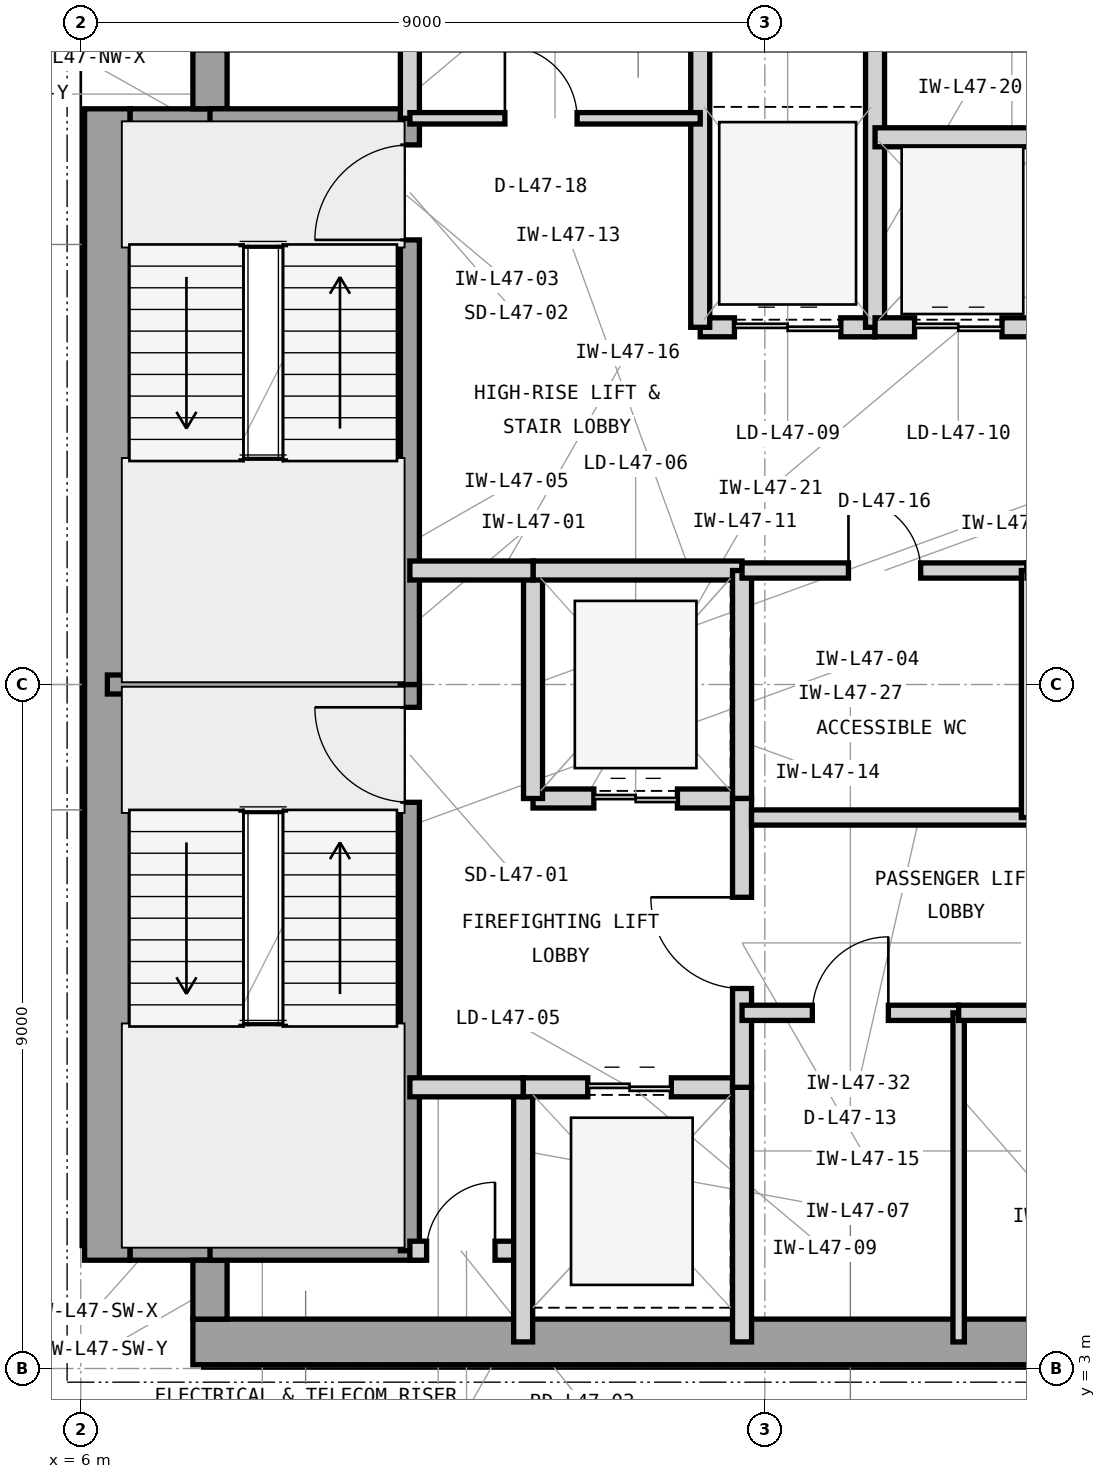
"""IFC4 building model, lengths in metres.
Left out: names, types, materials, properties, quantities, classifications, styles, units other than length and angle.
Written with IfcOpenShell. Run it as: python <this file> out.ifc"""

import sys

from ifc_helpers import new_model, si_unit, direction, frame, frame_2d, origin, place, context, subcontext, project, spatial, rectangle, extrude, element, fill, save


model = new_model("IFC4")
c1 = context("Model", 3, precision=1e-05, world=origin(), true_north=direction((0.0, 1.0)))
c2 = subcontext(c1, "Body", "Model", "MODEL_VIEW")
j1 = project(units=[si_unit("LENGTHUNIT", "METRE"), si_unit("PLANEANGLEUNIT", "RADIAN")], contexts=[c1])
p1 = place(None, origin())
s1 = spatial("IfcSite", under=j1, at=p1, CompositionType="ELEMENT")
p2 = place(p1, origin())
s2 = spatial("IfcBuilding", under=s1, at=p2, CompositionType="ELEMENT")
p3 = place(p2, frame((0.0, 0.0, 195.6)))
s3 = spatial("IfcBuildingStorey", under=s2, at=p3, CompositionType="ELEMENT", Elevation=195.6)
p4 = place(p3, frame((7.475, 3.35, 0.0), z_axis=(0.0, 0.0, 1.0), x_axis=(1.0, 0.0, 0.0)))
e1 = element("IfcWall", 1, at=p4, inside=s3, PredefinedType="SHEAR", context=c2, shape_type="SweptSolid", body=[
    extrude(rectangle(XDim=16.475, YDim=0.6, at=frame_2d((8.237, 0.0))), origin(), (0.0, 0.0, 1.0), 3.9),
])
p5 = place(p3, frame((6.35, 4.425, 0.0), z_axis=(0.0, 0.0, 1.0), x_axis=(0.0, 1.0, 0.0)))
e2 = element("IfcWall", 2, at=p5, inside=s3, PredefinedType="SHEAR", context=c2, shape_type="SweptSolid", body=[
    extrude(rectangle(XDim=15.15, YDim=0.6, at=frame_2d((7.575, 0.0))), origin(), (0.0, 0.0, 1.0), 3.9),
])
p6 = place(p3, frame((6.65, 4.65, 0.0), z_axis=(0.0, 0.0, 1.0), x_axis=(1.0, 0.0, 0.0)))
e3 = element("IfcWall", 3, at=p6, inside=s3, PredefinedType="SHEAR", context=c2, shape_type="SweptSolid", body=[
    extrude(rectangle(XDim=1.275, YDim=0.45, at=frame_2d((0.638, 0.0))), origin(), (0.0, 0.0, 1.0), 3.9),
])
p7 = place(p3, frame((7.7, 3.65, 0.0), z_axis=(0.0, 0.0, 1.0), x_axis=(0.0, 1.0, 0.0)))
e4 = element("IfcWall", 4, at=p7, inside=s3, PredefinedType="SHEAR", context=c2, shape_type="SweptSolid", body=[
    extrude(rectangle(XDim=0.775, YDim=0.45, at=frame_2d((0.388, 0.0))), origin(), (0.0, 0.0, 1.0), 3.9),
])
p8 = place(p3, frame((6.65, 19.35, 0.0), z_axis=(0.0, 0.0, 1.0), x_axis=(1.0, 0.0, 0.0)))
e5 = element("IfcWall", 5, at=p8, inside=s3, PredefinedType="SHEAR", context=c2, shape_type="SweptSolid", body=[
    extrude(rectangle(XDim=1.275, YDim=0.45, at=frame_2d((0.638, 0.0))), origin(), (0.0, 0.0, 1.0), 3.9),
])
p9 = place(p3, frame((7.7, 19.575, 0.0), z_axis=(0.0, 0.0, 1.0), x_axis=(0.0, 1.0, 0.0)))
e6 = element("IfcWall", 6, at=p9, inside=s3, PredefinedType="SHEAR", context=c2, shape_type="SweptSolid", body=[
    extrude(rectangle(XDim=0.775, YDim=0.45, at=frame_2d((0.388, 0.0))), origin(), (0.0, 0.0, 1.0), 3.9),
])
p10 = place(p3, frame((6.35, 12.0, 0.0), z_axis=(0.0, 0.0, 1.0), x_axis=(1.0, 0.0, 0.0)))
e7 = element("IfcWall", 7, at=p10, inside=s3, PredefinedType="SHEAR", context=c2, shape_type="SweptSolid", body=[
    extrude(rectangle(XDim=4.105, YDim=0.25, at=frame_2d((2.052, 0.0))), origin(), (0.0, 0.0, 1.0), 3.9),
])
for number, where, z_axis, x_axis in (
    (8, (7.7, 4.55, 0.0), (0.0, 0.0, 1.0), (1.0, 0.0, 0.0)),
    (9, (7.7, 19.45, 0.0), (0.0, 0.0, 1.0), (1.0, 0.0, 0.0)),
):
    element("IfcWall", number, at=place(p3, frame(where, z_axis=z_axis, x_axis=x_axis)), inside=s3, PredefinedType="SHEAR", context=c2, shape_type="SweptSolid", body=[
        extrude(rectangle(XDim=2.755, YDim=0.25, at=frame_2d((1.377, 0.0))), origin(), (0.0, 0.0, 1.0), 3.9),
    ])
p11 = place(p3, frame((10.33, 4.55, 0.0), z_axis=(0.0, 0.0, 1.0), x_axis=(0.0, 1.0, 0.0)))
e10 = element("IfcWall", 10, at=p11, inside=s3, PredefinedType="SHEAR", context=c2, shape_type="SweptSolid", body=[
    extrude(rectangle(XDim=7.45, YDim=0.25, at=frame_2d((3.725, 0.0))), origin(), (0.0, 0.0, 1.0), 3.9),
])
p12 = place(p11, frame((5.9, 0.0, 0.0)))
e11 = element("IfcOpeningElement", 11, at=p12, cuts=e10, PredefinedType="OPENING", context=c2, shape_type="SweptSolid", body=[
    extrude(rectangle(XDim=1.25, YDim=2.2, at=frame_2d((0.625, 1.1))), frame((0.0, 0.135, 0.0), z_axis=(0.0, -1.0, 0.0), x_axis=(1.0, 0.0, 0.0)), (0.0, 0.0, 1.0), 0.27),
])
p13 = place(p3, frame((10.33, 12.0, 0.0), z_axis=(0.0, 0.0, 1.0), x_axis=(0.0, 1.0, 0.0)))
e12 = element("IfcWall", 12, at=p13, inside=s3, PredefinedType="SHEAR", context=c2, shape_type="SweptSolid", body=[
    extrude(rectangle(XDim=7.45, YDim=0.25, at=frame_2d((3.725, 0.0))), origin(), (0.0, 0.0, 1.0), 3.9),
])
p14 = place(p13, frame((5.85, 0.0, 0.0)))
e13 = element("IfcOpeningElement", 13, at=p14, cuts=e12, PredefinedType="OPENING", context=c2, shape_type="SweptSolid", body=[
    extrude(rectangle(XDim=1.25, YDim=2.2, at=frame_2d((0.625, 1.1))), frame((0.0, 0.135, 0.0), z_axis=(0.0, -1.0, 0.0), x_axis=(1.0, 0.0, 0.0)), (0.0, 0.0, 1.0), 0.27),
])
p15 = place(p3, frame((10.33, 4.55, 0.0), z_axis=(0.0, 0.0, 1.0), x_axis=(1.0, 0.0, 0.0)))
e14 = element("IfcWall", 14, at=p15, inside=s3, PredefinedType="PARTITIONING", context=c2, shape_type="SweptSolid", body=[
    extrude(rectangle(XDim=1.49, YDim=0.25, at=frame_2d((0.745, 0.0))), origin(), (0.0, 0.0, 1.0), 3.69),
])
p16 = place(p15, frame((0.22, 0.0, 0.0)))
e15 = element("IfcOpeningElement", 15, at=p16, cuts=e14, PredefinedType="OPENING", context=c2, shape_type="SweptSolid", body=[
    extrude(rectangle(XDim=0.9, YDim=2.1, at=frame_2d((0.45, 1.05))), frame((0.0, 0.135, 0.0), z_axis=(0.0, -1.0, 0.0), x_axis=(1.0, 0.0, 0.0)), (0.0, 0.0, 1.0), 0.27),
])
p17 = place(p3, frame((11.82, 3.35, 0.0), z_axis=(0.0, 0.0, 1.0), x_axis=(0.0, 1.0, 0.0)))
e16 = element("IfcWall", 16, at=p17, inside=s3, PredefinedType="PARTITIONING", context=c2, shape_type="SweptSolid", body=[
    extrude(rectangle(XDim=3.35, YDim=0.25, at=frame_2d((1.675, 0.0))), origin(), (0.0, 0.0, 1.0), 3.69),
])
p18 = place(p3, frame((10.33, 19.45, 0.0), z_axis=(0.0, 0.0, 1.0), x_axis=(0.0, 1.0, 0.0)))
e17 = element("IfcWall", 17, at=p18, inside=s3, PredefinedType="PARTITIONING", context=c2, shape_type="SweptSolid", body=[
    extrude(rectangle(XDim=1.2, YDim=0.25, at=frame_2d((0.6, 0.0))), origin(), (0.0, 0.0, 1.0), 3.69),
])
p19 = place(p3, frame((11.82, 6.7, 0.0), z_axis=(0.0, 0.0, 1.0), x_axis=(1.0, 0.0, 0.0)))
e18 = element("IfcWall", 18, at=p19, inside=s3, PredefinedType="PARTITIONING", context=c2, shape_type="SweptSolid", body=[
    extrude(rectangle(XDim=2.88, YDim=0.25, at=frame_2d((1.44, 0.0))), origin(), (0.0, 0.0, 1.0), 3.283),
])
p20 = place(p19, frame((0.85, 0.0, 0.0)))
e19 = element("IfcOpeningElement", 19, at=p20, cuts=e18, PredefinedType="OPENING", context=c2, shape_type="SweptSolid", body=[
    extrude(rectangle(XDim=1.1, YDim=2.25, at=frame_2d((0.55, 1.125))), frame((0.0, 0.135, 0.0), z_axis=(0.0, -1.0, 0.0), x_axis=(1.0, 0.0, 0.0)), (0.0, 0.0, 1.0), 0.27),
])
p21 = place(p3, frame((14.7, 3.35, 0.0), z_axis=(0.0, 0.0, 1.0), x_axis=(0.0, 1.0, 0.0)))
e20 = element("IfcWall", 20, at=p21, inside=s3, PredefinedType="PARTITIONING", context=c2, shape_type="SweptSolid", body=[
    extrude(rectangle(XDim=3.35, YDim=0.25, at=frame_2d((1.675, 0.0))), origin(), (0.0, 0.0, 1.0), 3.69),
])
p22 = place(p3, frame((11.95, 10.5, 0.0), z_axis=(0.0, 0.0, 1.0), x_axis=(1.0, 0.0, 0.0)))
e21 = element("IfcWall", 21, at=p22, inside=s3, PredefinedType="PARTITIONING", context=c2, shape_type="SweptSolid", body=[
    extrude(rectangle(XDim=2.75, YDim=0.25, at=frame_2d((1.375, 0.0))), origin(), (0.0, 0.0, 1.0), 3.283),
])
p23 = place(p22, frame((0.8, 0.0, 0.0)))
e22 = element("IfcOpeningElement", 22, at=p23, cuts=e21, PredefinedType="OPENING", context=c2, shape_type="SweptSolid", body=[
    extrude(rectangle(XDim=1.1, YDim=2.25, at=frame_2d((0.55, 1.125))), frame((0.0, 0.135, 0.0), z_axis=(0.0, -1.0, 0.0), x_axis=(1.0, 0.0, 0.0)), (0.0, 0.0, 1.0), 0.27),
])
p24 = place(p3, frame((11.95, 10.5, 0.0), z_axis=(0.0, 0.0, 1.0), x_axis=(0.0, 1.0, 0.0)))
e23 = element("IfcWall", 23, at=p24, inside=s3, PredefinedType="PARTITIONING", context=c2, shape_type="SweptSolid", body=[
    extrude(rectangle(XDim=3.0, YDim=0.25, at=frame_2d((1.5, 0.0))), origin(), (0.0, 0.0, 1.0), 3.69),
])
p25 = place(p3, frame((11.95, 13.5, 0.0), z_axis=(0.0, 0.0, 1.0), x_axis=(1.0, 0.0, 0.0)))
e24 = element("IfcWall", 24, at=p25, inside=s3, PredefinedType="PARTITIONING", context=c2, shape_type="SweptSolid", body=[
    extrude(rectangle(XDim=2.75, YDim=0.25, at=frame_2d((1.375, 0.0))), origin(), (0.0, 0.0, 1.0), 3.283),
])
p26 = place(p3, frame((14.7, 10.5, 0.0), z_axis=(0.0, 0.0, 1.0), x_axis=(0.0, 1.0, 0.0)))
e25 = element("IfcWall", 25, at=p26, inside=s3, PredefinedType="PARTITIONING", context=c2, shape_type="SweptSolid", body=[
    extrude(rectangle(XDim=3.0, YDim=0.25, at=frame_2d((1.5, 0.0))), origin(), (0.0, 0.0, 1.0), 3.69),
])
p27 = place(p3, frame((14.7, 6.7, 0.0), z_axis=(0.0, 0.0, 1.0), x_axis=(0.0, 1.0, 0.0)))
e26 = element("IfcWall", 26, at=p27, inside=s3, PredefinedType="PARTITIONING", context=c2, shape_type="SweptSolid", body=[
    extrude(rectangle(XDim=3.8, YDim=0.25, at=frame_2d((1.9, 0.0))), origin(), (0.0, 0.0, 1.0), 3.69),
])
p28 = place(p27, frame((1.3, 0.0, 0.0)))
e27 = element("IfcOpeningElement", 27, at=p28, cuts=e26, PredefinedType="OPENING", context=c2, shape_type="SweptSolid", body=[
    extrude(rectangle(XDim=1.2, YDim=2.2, at=frame_2d((0.6, 1.1))), frame((0.0, 0.135, 0.0), z_axis=(0.0, -1.0, 0.0), x_axis=(1.0, 0.0, 0.0)), (0.0, 0.0, 1.0), 0.27),
])
p29 = place(p3, frame((10.33, 13.5, 0.0), z_axis=(0.0, 0.0, 1.0), x_axis=(1.0, 0.0, 0.0)))
e28 = element("IfcWall", 28, at=p29, inside=s3, PredefinedType="PARTITIONING", context=c2, shape_type="SweptSolid", body=[
    extrude(rectangle(XDim=1.62, YDim=0.25, at=frame_2d((0.81, 0.0))), origin(), (0.0, 0.0, 1.0), 3.283),
])
p30 = place(p3, frame((10.33, 6.7, 0.0), z_axis=(0.0, 0.0, 1.0), x_axis=(1.0, 0.0, 0.0)))
e29 = element("IfcWall", 29, at=p30, inside=s3, PredefinedType="PARTITIONING", context=c2, shape_type="SweptSolid", body=[
    extrude(rectangle(XDim=1.49, YDim=0.25, at=frame_2d((0.745, 0.0))), origin(), (0.0, 0.0, 1.0), 3.283),
])
p31 = place(p3, frame((14.15, 16.7, 0.0), z_axis=(0.0, 0.0, 1.0), x_axis=(1.0, 0.0, 0.0)))
e30 = element("IfcWall", 30, at=p31, inside=s3, PredefinedType="PARTITIONING", context=c2, shape_type="SweptSolid", body=[
    extrude(rectangle(XDim=2.3, YDim=0.25, at=frame_2d((1.15, 0.0))), origin(), (0.0, 0.0, 1.0), 3.283),
])
p32 = place(p31, frame((0.45, 0.0, 0.0)))
e31 = element("IfcOpeningElement", 31, at=p32, cuts=e30, PredefinedType="OPENING", context=c2, shape_type="SweptSolid", body=[
    extrude(rectangle(XDim=1.4, YDim=2.35, at=frame_2d((0.7, 1.175))), frame((0.0, 0.135, 0.0), z_axis=(0.0, -1.0, 0.0), x_axis=(1.0, 0.0, 0.0)), (0.0, 0.0, 1.0), 0.27),
])
for number, where, z_axis, x_axis in (
    (32, (14.15, 16.7, 0.0), (0.0, 0.0, 1.0), (0.0, 1.0, 0.0)),
    (33, (16.45, 16.7, 0.0), (0.0, 0.0, 1.0), (0.0, 1.0, 0.0)),
):
    element("IfcWall", number, at=place(p3, frame(where, z_axis=z_axis, x_axis=x_axis)), inside=s3, PredefinedType="PARTITIONING", context=c2, shape_type="SweptSolid", body=[
        extrude(rectangle(XDim=3.95, YDim=0.25, at=frame_2d((1.975, 0.0))), origin(), (0.0, 0.0, 1.0), 3.69),
    ])
p33 = place(p3, frame((16.45, 16.7, 0.0), z_axis=(0.0, 0.0, 1.0), x_axis=(1.0, 0.0, 0.0)))
e34 = element("IfcWall", 34, at=p33, inside=s3, PredefinedType="PARTITIONING", context=c2, shape_type="SweptSolid", body=[
    extrude(rectangle(XDim=2.3, YDim=0.25, at=frame_2d((1.15, 0.0))), origin(), (0.0, 0.0, 1.0), 3.283),
])
p34 = place(p33, frame((0.52, 0.0, 0.0)))
e35 = element("IfcOpeningElement", 35, at=p34, cuts=e34, PredefinedType="OPENING", context=c2, shape_type="SweptSolid", body=[
    extrude(rectangle(XDim=1.15, YDim=2.25, at=frame_2d((0.575, 1.125))), frame((0.0, 0.135, 0.0), z_axis=(0.0, -1.0, 0.0), x_axis=(1.0, 0.0, 0.0)), (0.0, 0.0, 1.0), 0.27),
])
p35 = place(p3, frame((16.45, 19.2, 0.0), z_axis=(0.0, 0.0, 1.0), x_axis=(1.0, 0.0, 0.0)))
e36 = element("IfcWall", 36, at=p35, inside=s3, PredefinedType="PARTITIONING", context=c2, shape_type="SweptSolid", body=[
    extrude(rectangle(XDim=7.2, YDim=0.25, at=frame_2d((3.6, 0.0))), origin(), (0.0, 0.0, 1.0), 3.69),
])
p36 = place(p3, frame((14.7, 7.68, 0.0), z_axis=(0.0, 0.0, 1.0), x_axis=(1.0, 0.0, 0.0)))
e37 = element("IfcWall", 37, at=p36, inside=s3, PredefinedType="PARTITIONING", context=c2, shape_type="SweptSolid", body=[
    extrude(rectangle(XDim=2.85, YDim=0.2, at=frame_2d((1.425, 0.0))), origin(), (0.0, 0.0, 1.0), 3.69),
])
p37 = place(p36, frame((0.925, 0.0, 0.0)))
e38 = element("IfcOpeningElement", 38, at=p37, cuts=e37, PredefinedType="OPENING", context=c2, shape_type="SweptSolid", body=[
    extrude(rectangle(XDim=1.0, YDim=2.15, at=frame_2d((0.5, 1.075))), frame((0.0, 0.11, 0.0), z_axis=(0.0, -1.0, 0.0), x_axis=(1.0, 0.0, 0.0)), (0.0, 0.0, 1.0), 0.22),
])
p38 = place(p3, frame((17.55, 3.35, 0.0), z_axis=(0.0, 0.0, 1.0), x_axis=(0.0, 1.0, 0.0)))
e39 = element("IfcWall", 39, at=p38, inside=s3, PredefinedType="PARTITIONING", context=c2, shape_type="SweptSolid", body=[
    extrude(rectangle(XDim=4.33, YDim=0.15, at=frame_2d((2.165, 0.0))), origin(), (0.0, 0.0, 1.0), 3.69),
])
p39 = place(p3, frame((17.55, 7.68, 0.0), z_axis=(0.0, 0.0, 1.0), x_axis=(1.0, 0.0, 0.0)))
e40 = element("IfcWall", 40, at=p39, inside=s3, PredefinedType="PARTITIONING", context=c2, shape_type="SweptSolid", body=[
    extrude(rectangle(XDim=3.0, YDim=0.2, at=frame_2d((1.5, 0.0))), origin(), (0.0, 0.0, 1.0), 3.69),
])
p40 = place(p39, frame((1.05, 0.0, 0.0)))
e41 = element("IfcOpeningElement", 41, at=p40, cuts=e40, PredefinedType="OPENING", context=c2, shape_type="SweptSolid", body=[
    extrude(rectangle(XDim=0.9, YDim=2.1, at=frame_2d((0.45, 1.05))), frame((0.0, 0.11, 0.0), z_axis=(0.0, -1.0, 0.0), x_axis=(1.0, 0.0, 0.0)), (0.0, 0.0, 1.0), 0.22),
])
p41 = place(p3, frame((14.825, 10.25, 0.0), z_axis=(0.0, 0.0, 1.0), x_axis=(1.0, 0.0, 0.0)))
e42 = element("IfcWall", 42, at=p41, inside=s3, PredefinedType="PARTITIONING", context=c2, shape_type="SweptSolid", body=[
    extrude(rectangle(XDim=8.825, YDim=0.2, at=frame_2d((4.413, 0.0))), origin(), (0.0, 0.0, 1.0), 3.69),
])
p42 = place(p3, frame((14.7, 13.5, 0.0), z_axis=(0.0, 0.0, 1.0), x_axis=(1.0, 0.0, 0.0)))
e43 = element("IfcWall", 43, at=p42, inside=s3, PredefinedType="PARTITIONING", context=c2, shape_type="SweptSolid", body=[
    extrude(rectangle(XDim=3.75, YDim=0.2, at=frame_2d((1.875, 0.0))), origin(), (0.0, 0.0, 1.0), 3.283),
])
p43 = place(p42, frame((1.4, 0.0, 0.0)))
e44 = element("IfcOpeningElement", 44, at=p43, cuts=e43, PredefinedType="OPENING", context=c2, shape_type="SweptSolid", body=[
    extrude(rectangle(XDim=0.95, YDim=2.1, at=frame_2d((0.475, 1.05))), frame((0.0, 0.11, 0.0), z_axis=(0.0, -1.0, 0.0), x_axis=(1.0, 0.0, 0.0)), (0.0, 0.0, 1.0), 0.22),
])
p44 = place(p3, frame((18.45, 10.25, 0.0), z_axis=(0.0, 0.0, 1.0), x_axis=(0.0, 1.0, 0.0)))
e45 = element("IfcWall", 45, at=p44, inside=s3, PredefinedType="PARTITIONING", context=c2, shape_type="SweptSolid", body=[
    extrude(rectangle(XDim=3.25, YDim=0.15, at=frame_2d((1.625, 0.0))), origin(), (0.0, 0.0, 1.0), 3.69),
])
p45 = place(p3, frame((10.33, 19.45, 0.0), z_axis=(0.0, 0.0, 1.0), x_axis=(1.0, 0.0, 0.0)))
e46 = element("IfcWall", 46, at=p45, inside=s3, PredefinedType="PARTITIONING", context=c2, shape_type="SweptSolid", body=[
    extrude(rectangle(XDim=3.82, YDim=0.15, at=frame_2d((1.91, 0.0))), origin(), (0.0, 0.0, 1.0), 3.69),
])
p46 = place(p45, frame((1.25, 0.0, 0.0)))
e47 = element("IfcOpeningElement", 47, at=p46, cuts=e46, PredefinedType="OPENING", context=c2, shape_type="SweptSolid", body=[
    extrude(rectangle(XDim=0.95, YDim=2.1, at=frame_2d((0.475, 1.05))), frame((0.0, 0.085, 0.0), z_axis=(0.0, -1.0, 0.0), x_axis=(1.0, 0.0, 0.0)), (0.0, 0.0, 1.0), 0.17),
])
p47 = place(p12, origin())
e48 = element("IfcDoor", 48, at=p47, inside=s3, OperationType="SINGLE_SWING_RIGHT", PredefinedType="DOOR", context=c2, shape_type="SweptSolid", body=[
    extrude(rectangle(XDim=1.25, YDim=2.2, at=frame_2d((0.625, 1.1))), frame((0.0, 0.025, 0.0), z_axis=(0.0, -1.0, 0.0), x_axis=(1.0, 0.0, 0.0)), (0.0, 0.0, 1.0), 0.05),
])
fill(e11, e48)
p48 = place(p14, origin())
e49 = element("IfcDoor", 49, at=p48, inside=s3, OperationType="SINGLE_SWING_LEFT", PredefinedType="DOOR", context=c2, shape_type="SweptSolid", body=[
    extrude(rectangle(XDim=1.25, YDim=2.2, at=frame_2d((0.625, 1.1))), frame((0.0, 0.025, 0.0), z_axis=(0.0, -1.0, 0.0), x_axis=(1.0, 0.0, 0.0)), (0.0, 0.0, 1.0), 0.05),
])
fill(e13, e49)
p49 = place(p16, origin())
e50 = element("IfcDoor", 50, at=p49, inside=s3, OperationType="SINGLE_SWING_RIGHT", PredefinedType="TRAPDOOR", context=c2, shape_type="SweptSolid", body=[
    extrude(rectangle(XDim=0.9, YDim=2.1, at=frame_2d((0.45, 1.05))), frame((0.0, 0.025, 0.0), z_axis=(0.0, -1.0, 0.0), x_axis=(1.0, 0.0, 0.0)), (0.0, 0.0, 1.0), 0.05),
])
fill(e15, e50)
p50 = place(p20, origin())
e51 = element("IfcDoor", 51, at=p50, inside=s3, OperationType="DOUBLE_DOOR_SLIDING", PredefinedType="DOOR", context=c2, shape_type="SweptSolid", body=[
    extrude(rectangle(XDim=1.1, YDim=2.25, at=frame_2d((0.55, 1.125))), frame((0.0, 0.025, 0.0), z_axis=(0.0, -1.0, 0.0), x_axis=(1.0, 0.0, 0.0)), (0.0, 0.0, 1.0), 0.05),
])
fill(e19, e51)
p51 = place(p23, origin())
e52 = element("IfcDoor", 52, at=p51, inside=s3, OperationType="DOUBLE_DOOR_SLIDING", PredefinedType="DOOR", context=c2, shape_type="SweptSolid", body=[
    extrude(rectangle(XDim=1.1, YDim=2.25, at=frame_2d((0.55, 1.125))), frame((0.0, 0.025, 0.0), z_axis=(0.0, -1.0, 0.0), x_axis=(1.0, 0.0, 0.0)), (0.0, 0.0, 1.0), 0.05),
])
fill(e22, e52)
p52 = place(p28, origin())
e53 = element("IfcDoor", 53, at=p52, inside=s3, OperationType="SINGLE_SWING_RIGHT", PredefinedType="DOOR", context=c2, shape_type="SweptSolid", body=[
    extrude(rectangle(XDim=1.2, YDim=2.2, at=frame_2d((0.6, 1.1))), frame((0.0, 0.025, 0.0), z_axis=(0.0, -1.0, 0.0), x_axis=(1.0, 0.0, 0.0)), (0.0, 0.0, 1.0), 0.05),
])
fill(e27, e53)
p53 = place(p32, origin())
e54 = element("IfcDoor", 54, at=p53, inside=s3, OperationType="DOUBLE_DOOR_SLIDING", PredefinedType="DOOR", context=c2, shape_type="SweptSolid", body=[
    extrude(rectangle(XDim=1.4, YDim=2.35, at=frame_2d((0.7, 1.175))), frame((0.0, 0.025, 0.0), z_axis=(0.0, -1.0, 0.0), x_axis=(1.0, 0.0, 0.0)), (0.0, 0.0, 1.0), 0.05),
])
fill(e31, e54)
p54 = place(p34, origin())
e55 = element("IfcDoor", 55, at=p54, inside=s3, OperationType="DOUBLE_DOOR_SLIDING", PredefinedType="DOOR", context=c2, shape_type="SweptSolid", body=[
    extrude(rectangle(XDim=1.15, YDim=2.25, at=frame_2d((0.575, 1.125))), frame((0.0, 0.025, 0.0), z_axis=(0.0, -1.0, 0.0), x_axis=(1.0, 0.0, 0.0)), (0.0, 0.0, 1.0), 0.05),
])
fill(e35, e55)
p55 = place(p37, origin())
e56 = element("IfcDoor", 56, at=p55, inside=s3, OperationType="SINGLE_SWING_RIGHT", PredefinedType="DOOR", context=c2, shape_type="SweptSolid", body=[
    extrude(rectangle(XDim=1.0, YDim=2.15, at=frame_2d((0.5, 1.075))), frame((0.0, 0.025, 0.0), z_axis=(0.0, -1.0, 0.0), x_axis=(1.0, 0.0, 0.0)), (0.0, 0.0, 1.0), 0.05),
])
fill(e38, e56)
p56 = place(p43, origin())
e57 = element("IfcDoor", 57, at=p56, inside=s3, OperationType="SINGLE_SWING_LEFT", PredefinedType="DOOR", context=c2, shape_type="SweptSolid", body=[
    extrude(rectangle(XDim=0.95, YDim=2.1, at=frame_2d((0.475, 1.05))), frame((0.0, 0.025, 0.0), z_axis=(0.0, -1.0, 0.0), x_axis=(1.0, 0.0, 0.0)), (0.0, 0.0, 1.0), 0.05),
])
fill(e44, e57)
p57 = place(p46, origin())
e58 = element("IfcDoor", 58, at=p57, inside=s3, OperationType="SINGLE_SWING_LEFT", PredefinedType="DOOR", context=c2, shape_type="SweptSolid", body=[
    extrude(rectangle(XDim=0.95, YDim=2.1, at=frame_2d((0.475, 1.05))), frame((0.0, 0.025, 0.0), z_axis=(0.0, -1.0, 0.0), x_axis=(1.0, 0.0, 0.0)), (0.0, 0.0, 1.0), 0.05),
])
fill(e47, e58)
save(model, sys.argv[1])
